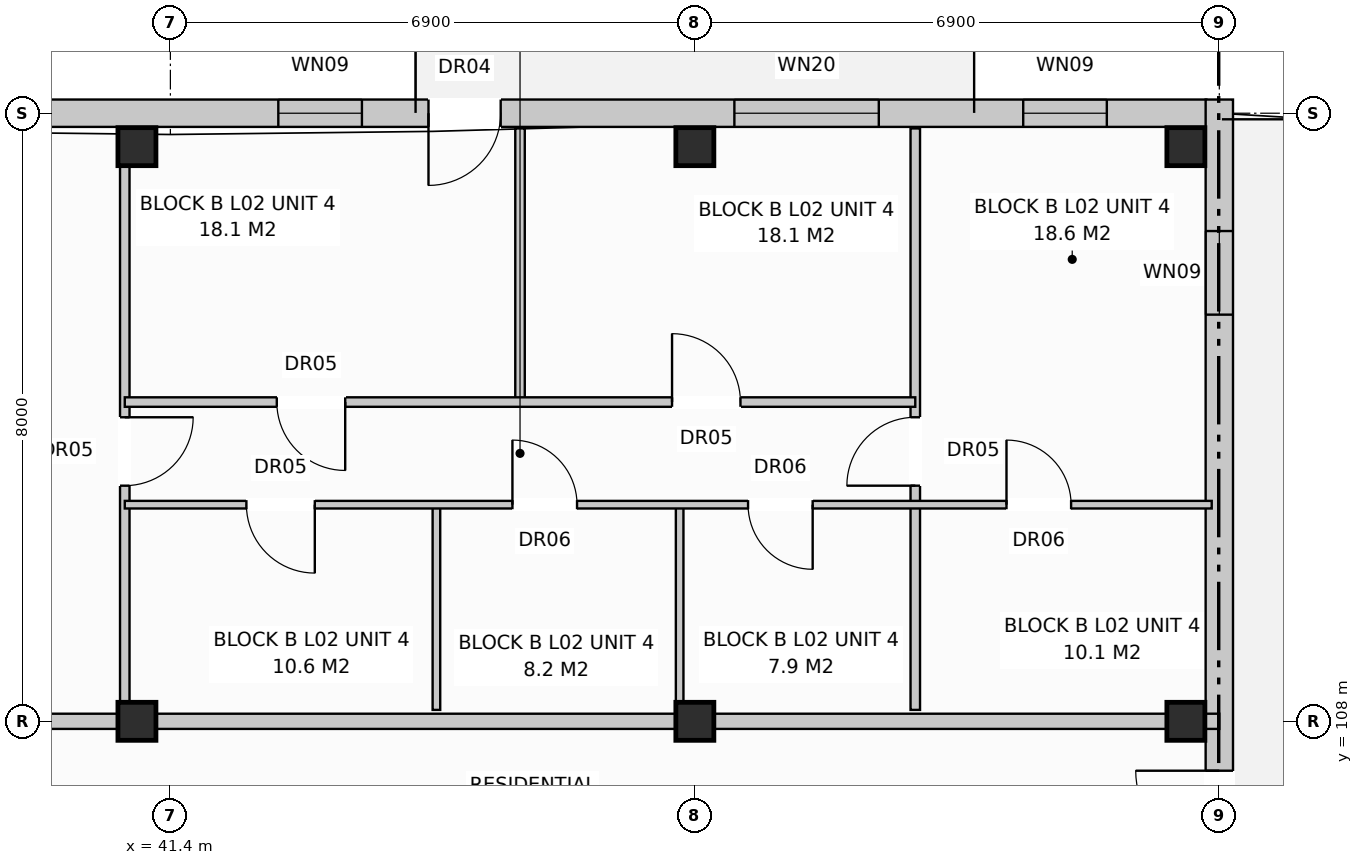
"""IFC4 building model, lengths in metres.
Left out: names, types, materials, properties, quantities, classifications, styles, units other than length and angle.
Written with IfcOpenShell. Run it as: python <this file> out.ifc"""

import sys

from ifc_helpers import new_model, si_unit, direction, frame, frame_2d, origin, origin_with_axes, origin_2d, place, context, subcontext, project, spatial, rectangle, extrude, element, fill, save


model = new_model("IFC4")
c1 = context("Model", 3, precision=1e-05, world=origin(), true_north=direction((0.0, 1.0)))
c2 = subcontext(c1, "Body", "Model", "MODEL_VIEW")
j1 = project(units=[si_unit("LENGTHUNIT", "METRE"), si_unit("PLANEANGLEUNIT", "RADIAN")], contexts=[c1])
p1 = place(None, origin())
s1 = spatial("IfcSite", under=j1, at=p1, CompositionType="ELEMENT")
p2 = place(p1, origin())
s2 = spatial("IfcBuilding", under=s1, at=p2, CompositionType="ELEMENT")
p3 = place(p2, frame((0.0, 0.0, 8.0)))
s3 = spatial("IfcBuildingStorey", under=s2, at=p3, CompositionType="ELEMENT", Elevation=8.0)
for number, where, z_axis, x_axis in (
    (1, (40.96, 108.0, 0.0), (0.0, 0.0, 1.0), (1.0, 0.0, 0.0)),
    (2, (40.96, 115.56, 0.0), (0.0, 0.0, 1.0), (1.0, 0.0, 0.0)),
    (3, (48.3, 108.0, 0.0), (0.0, 0.0, 1.0), (1.0, 0.0, 0.0)),
    (4, (48.3, 115.56, 0.0), (0.0, 0.0, 1.0), (1.0, 0.0, 0.0)),
    (5, (54.76, 108.0, 0.0), (0.0, 0.0, 1.0), (1.0, 0.0, 0.0)),
    (6, (54.76, 115.56, 0.0), (0.0, 0.0, 1.0), (1.0, 0.0, 0.0)),
):
    element("IfcColumn", number, at=place(p3, frame(where, z_axis=z_axis, x_axis=x_axis)), inside=s3, PredefinedType="COLUMN", context=c2, shape_type="SweptSolid", body=[
        extrude(rectangle(XDim=0.5, YDim=0.5, at=origin_2d()), origin(), (0.0, 0.0, 1.0), 3.2),
    ])
p4 = place(p3, frame((0.17, 116.0, 0.0), z_axis=(0.0, 0.0, 1.0), x_axis=(1.0, 0.0, 0.0)))
e7 = element("IfcWall", 7, at=p4, inside=s3, PredefinedType="STANDARD", context=c2, shape_type="SweptSolid", body=[
    extrude(rectangle(XDim=54.86, YDim=0.36, at=frame_2d((27.43, 0.0))), origin(), (0.0, 0.0, 1.0), 2.94),
])
p5 = place(p4, frame((5.1, 0.0, 0.0)))
e8 = element("IfcOpeningElement", 8, at=p5, cuts=e7, PredefinedType="OPENING", context=c2, shape_type="SweptSolid", body=[
    extrude(rectangle(XDim=0.95, YDim=2.1, at=frame_2d((0.475, 1.05))), frame((0.0, 0.192, 0.0), z_axis=(0.0, -1.0, 0.0), x_axis=(1.0, 0.0, 0.0)), (0.0, 0.0, 1.0), 0.384),
])
p6 = place(p4, frame((18.904, 0.0, 0.0)))
e9 = element("IfcOpeningElement", 9, at=p6, cuts=e7, PredefinedType="OPENING", context=c2, shape_type="SweptSolid", body=[
    extrude(rectangle(XDim=0.95, YDim=2.1, at=frame_2d((0.475, 1.05))), frame((0.0, 0.192, 0.0), z_axis=(0.0, -1.0, 0.0), x_axis=(1.0, 0.0, 0.0)), (0.0, 0.0, 1.0), 0.384),
])
p7 = place(p4, frame((32.704, 0.0, 0.0)))
e10 = element("IfcOpeningElement", 10, at=p7, cuts=e7, PredefinedType="OPENING", context=c2, shape_type="SweptSolid", body=[
    extrude(rectangle(XDim=0.95, YDim=2.1, at=frame_2d((0.475, 1.05))), frame((0.0, 0.192, 0.0), z_axis=(0.0, -1.0, 0.0), x_axis=(1.0, 0.0, 0.0)), (0.0, 0.0, 1.0), 0.384),
])
p8 = place(p4, frame((44.626, 0.0, 0.0)))
e11 = element("IfcOpeningElement", 11, at=p8, cuts=e7, PredefinedType="OPENING", context=c2, shape_type="SweptSolid", body=[
    extrude(rectangle(XDim=0.95, YDim=2.1, at=frame_2d((0.475, 1.05))), frame((0.0, 0.192, 0.0), z_axis=(0.0, -1.0, 0.0), x_axis=(1.0, 0.0, 0.0)), (0.0, 0.0, 1.0), 0.384),
])
p9 = place(p4, frame((1.25, 0.0, 0.72)))
e12 = element("IfcOpeningElement", 12, at=p9, cuts=e7, PredefinedType="OPENING", context=c2, shape_type="SweptSolid", body=[
    extrude(rectangle(XDim=1.1, YDim=1.5, at=frame_2d((0.55, 0.75))), frame((0.0, 0.192, 0.0), z_axis=(0.0, -1.0, 0.0), x_axis=(1.0, 0.0, 0.0)), (0.0, 0.0, 1.0), 0.384),
])
p10 = place(p4, frame((7.925, 0.0, 0.8)))
e13 = element("IfcOpeningElement", 13, at=p10, cuts=e7, PredefinedType="OPENING", context=c2, shape_type="SweptSolid", body=[
    extrude(rectangle(XDim=1.95, YDim=1.65, at=frame_2d((0.975, 0.825))), frame((0.0, 0.192, 0.0), z_axis=(0.0, -1.0, 0.0), x_axis=(1.0, 0.0, 0.0)), (0.0, 0.0, 1.0), 0.384),
])
p11 = place(p4, frame((11.65, 0.0, 0.72)))
e14 = element("IfcOpeningElement", 14, at=p11, cuts=e7, PredefinedType="OPENING", context=c2, shape_type="SweptSolid", body=[
    extrude(rectangle(XDim=1.1, YDim=1.5, at=frame_2d((0.55, 0.75))), frame((0.0, 0.192, 0.0), z_axis=(0.0, -1.0, 0.0), x_axis=(1.0, 0.0, 0.0)), (0.0, 0.0, 1.0), 0.384),
])
p12 = place(p4, frame((16.75, 0.0, 0.8)))
e15 = element("IfcOpeningElement", 15, at=p12, cuts=e7, PredefinedType="OPENING", context=c2, shape_type="SweptSolid", body=[
    extrude(rectangle(XDim=1.9, YDim=1.85, at=frame_2d((0.95, 0.925))), frame((0.0, 0.192, 0.0), z_axis=(0.0, -1.0, 0.0), x_axis=(1.0, 0.0, 0.0)), (0.0, 0.0, 1.0), 0.384),
])
p13 = place(p4, frame((22.225, 0.0, 0.8)))
e16 = element("IfcOpeningElement", 16, at=p13, cuts=e7, PredefinedType="OPENING", context=c2, shape_type="SweptSolid", body=[
    extrude(rectangle(XDim=1.95, YDim=1.65, at=frame_2d((0.975, 0.825))), frame((0.0, 0.192, 0.0), z_axis=(0.0, -1.0, 0.0), x_axis=(1.0, 0.0, 0.0)), (0.0, 0.0, 1.0), 0.384),
])
p14 = place(p4, frame((28.35, 0.0, 0.72)))
e17 = element("IfcOpeningElement", 17, at=p14, cuts=e7, PredefinedType="OPENING", context=c2, shape_type="SweptSolid", body=[
    extrude(rectangle(XDim=1.1, YDim=1.5, at=frame_2d((0.55, 0.75))), frame((0.0, 0.192, 0.0), z_axis=(0.0, -1.0, 0.0), x_axis=(1.0, 0.0, 0.0)), (0.0, 0.0, 1.0), 0.384),
])
p15 = place(p4, frame((30.55, 0.0, 0.8)))
e18 = element("IfcOpeningElement", 18, at=p15, cuts=e7, PredefinedType="OPENING", context=c2, shape_type="SweptSolid", body=[
    extrude(rectangle(XDim=1.9, YDim=1.85, at=frame_2d((0.95, 0.925))), frame((0.0, 0.192, 0.0), z_axis=(0.0, -1.0, 0.0), x_axis=(1.0, 0.0, 0.0)), (0.0, 0.0, 1.0), 0.384),
])
p16 = place(p4, frame((36.525, 0.0, 0.8)))
e19 = element("IfcOpeningElement", 19, at=p16, cuts=e7, PredefinedType="OPENING", context=c2, shape_type="SweptSolid", body=[
    extrude(rectangle(XDim=1.95, YDim=1.65, at=frame_2d((0.975, 0.825))), frame((0.0, 0.192, 0.0), z_axis=(0.0, -1.0, 0.0), x_axis=(1.0, 0.0, 0.0)), (0.0, 0.0, 1.0), 0.384),
])
p17 = place(p4, frame((42.65, 0.0, 0.72)))
e20 = element("IfcOpeningElement", 20, at=p17, cuts=e7, PredefinedType="OPENING", context=c2, shape_type="SweptSolid", body=[
    extrude(rectangle(XDim=1.1, YDim=1.5, at=frame_2d((0.55, 0.75))), frame((0.0, 0.192, 0.0), z_axis=(0.0, -1.0, 0.0), x_axis=(1.0, 0.0, 0.0)), (0.0, 0.0, 1.0), 0.384),
])
p18 = place(p4, frame((48.65, 0.0, 0.72)))
e21 = element("IfcOpeningElement", 21, at=p18, cuts=e7, PredefinedType="OPENING", context=c2, shape_type="SweptSolid", body=[
    extrude(rectangle(XDim=1.9, YDim=1.85, at=frame_2d((0.95, 0.925))), frame((0.0, 0.192, 0.0), z_axis=(0.0, -1.0, 0.0), x_axis=(1.0, 0.0, 0.0)), (0.0, 0.0, 1.0), 0.384),
])
p19 = place(p4, frame((52.45, 0.0, 0.72)))
e22 = element("IfcOpeningElement", 22, at=p19, cuts=e7, PredefinedType="OPENING", context=c2, shape_type="SweptSolid", body=[
    extrude(rectangle(XDim=1.1, YDim=1.5, at=frame_2d((0.55, 0.75))), frame((0.0, 0.192, 0.0), z_axis=(0.0, -1.0, 0.0), x_axis=(1.0, 0.0, 0.0)), (0.0, 0.0, 1.0), 0.384),
])
p20 = place(p3, frame((55.2, 97.42, 0.0), z_axis=(0.0, 0.0, 1.0), x_axis=(0.0, 1.0, 0.0)))
e23 = element("IfcWall", 23, at=p20, inside=s3, PredefinedType="STANDARD", context=c2, shape_type="SweptSolid", body=[
    extrude(rectangle(XDim=18.76, YDim=0.36, at=frame_2d((9.38, 0.0))), origin(), (0.0, 0.0, 1.0), 2.94),
])
p21 = place(p20, frame((8.83, 0.0, 0.0)))
e24 = element("IfcOpeningElement", 24, at=p21, cuts=e23, PredefinedType="OPENING", context=c2, shape_type="SweptSolid", body=[
    extrude(rectangle(XDim=1.1, YDim=2.1, at=frame_2d((0.55, 1.05))), frame((0.0, 0.192, 0.0), z_axis=(0.0, -1.0, 0.0), x_axis=(1.0, 0.0, 0.0)), (0.0, 0.0, 1.0), 0.384),
])
p22 = place(p20, frame((1.73, 0.0, 0.72)))
e25 = element("IfcOpeningElement", 25, at=p22, cuts=e23, PredefinedType="OPENING", context=c2, shape_type="SweptSolid", body=[
    extrude(rectangle(XDim=1.1, YDim=1.5, at=frame_2d((0.55, 0.75))), frame((0.0, 0.192, 0.0), z_axis=(0.0, -1.0, 0.0), x_axis=(1.0, 0.0, 0.0)), (0.0, 0.0, 1.0), 0.384),
])
p23 = place(p20, frame((15.93, 0.0, 0.72)))
e26 = element("IfcOpeningElement", 26, at=p23, cuts=e23, PredefinedType="OPENING", context=c2, shape_type="SweptSolid", body=[
    extrude(rectangle(XDim=1.1, YDim=1.5, at=frame_2d((0.55, 0.75))), frame((0.0, 0.192, 0.0), z_axis=(0.0, -1.0, 0.0), x_axis=(1.0, 0.0, 0.0)), (0.0, 0.0, 1.0), 0.384),
])
p24 = place(p3, frame((34.5, 108.0, 0.0), z_axis=(0.0, 0.0, 1.0), x_axis=(1.0, 0.0, 0.0)))
e27 = element("IfcWall", 27, at=p24, inside=s3, PredefinedType="PARTITIONING", context=c2, shape_type="SweptSolid", body=[
    extrude(rectangle(XDim=20.7, YDim=0.2, at=frame_2d((10.35, 0.0))), origin(), (0.0, 0.0, 1.0), 2.38),
])
p25 = place(p24, frame((2.4, 0.0, 0.0)))
e28 = element("IfcOpeningElement", 28, at=p25, cuts=e27, PredefinedType="OPENING", context=c2, shape_type="SweptSolid", body=[
    extrude(rectangle(XDim=0.95, YDim=2.15, at=frame_2d((0.475, 1.075))), frame((0.0, 0.112, 0.0), z_axis=(0.0, -1.0, 0.0), x_axis=(1.0, 0.0, 0.0)), (0.0, 0.0, 1.0), 0.224),
])
p26 = place(p3, frame((40.8, 108.15, 0.0), z_axis=(0.0, 0.0, 1.0), x_axis=(0.0, 1.0, 0.0)))
e29 = element("IfcWall", 29, at=p26, inside=s3, PredefinedType="PARTITIONING", context=c2, shape_type="SweptSolid", body=[
    extrude(rectangle(XDim=7.65, YDim=0.125, at=frame_2d((3.825, 0.0))), origin(), (0.0, 0.0, 1.0), 2.94),
])
p27 = place(p26, frame((2.95, 0.0, 0.0)))
e30 = element("IfcOpeningElement", 30, at=p27, cuts=e29, PredefinedType="OPENING", context=c2, shape_type="SweptSolid", body=[
    extrude(rectangle(XDim=0.9, YDim=2.1, at=frame_2d((0.45, 1.05))), frame((0.0, 0.074, 0.0), z_axis=(0.0, -1.0, 0.0), x_axis=(1.0, 0.0, 0.0)), (0.0, 0.0, 1.0), 0.149),
])
p28 = place(p3, frame((44.9, 108.15, 0.0), z_axis=(0.0, 0.0, 1.0), x_axis=(0.0, 1.0, 0.0)))
e31 = element("IfcWall", 31, at=p28, inside=s3, PredefinedType="PARTITIONING", context=c2, shape_type="SweptSolid", body=[
    extrude(rectangle(XDim=2.7, YDim=0.1, at=frame_2d((1.35, 0.0))), origin(), (0.0, 0.0, 1.0), 2.94),
])
p29 = place(p3, frame((48.1, 108.15, 0.0), z_axis=(0.0, 0.0, 1.0), x_axis=(0.0, 1.0, 0.0)))
e32 = element("IfcWall", 32, at=p29, inside=s3, PredefinedType="PARTITIONING", context=c2, shape_type="SweptSolid", body=[
    extrude(rectangle(XDim=2.7, YDim=0.1, at=frame_2d((1.35, 0.0))), origin(), (0.0, 0.0, 1.0), 2.38),
])
p30 = place(p3, frame((46.0, 112.2, 0.0), z_axis=(0.0, 0.0, 1.0), x_axis=(0.0, 1.0, 0.0)))
e33 = element("IfcWall", 33, at=p30, inside=s3, PredefinedType="PARTITIONING", context=c2, shape_type="SweptSolid", body=[
    extrude(rectangle(XDim=3.6, YDim=0.125, at=frame_2d((1.8, 0.0))), origin(), (0.0, 0.0, 1.0), 2.94),
])
p31 = place(p3, frame((51.2, 108.15, 0.0), z_axis=(0.0, 0.0, 1.0), x_axis=(0.0, 1.0, 0.0)))
e34 = element("IfcWall", 34, at=p31, inside=s3, PredefinedType="PARTITIONING", context=c2, shape_type="SweptSolid", body=[
    extrude(rectangle(XDim=7.65, YDim=0.125, at=frame_2d((3.825, 0.0))), origin(), (0.0, 0.0, 1.0), 2.94),
])
p32 = place(p31, frame((2.95, 0.0, 0.0)))
e35 = element("IfcOpeningElement", 35, at=p32, cuts=e34, PredefinedType="OPENING", context=c2, shape_type="SweptSolid", body=[
    extrude(rectangle(XDim=0.9, YDim=2.1, at=frame_2d((0.45, 1.05))), frame((0.0, 0.074, 0.0), z_axis=(0.0, -1.0, 0.0), x_axis=(1.0, 0.0, 0.0)), (0.0, 0.0, 1.0), 0.149),
])
p33 = place(p3, frame((40.8, 110.85, 0.0), z_axis=(0.0, 0.0, 1.0), x_axis=(1.0, 0.0, 0.0)))
e36 = element("IfcWall", 36, at=p33, inside=s3, PredefinedType="PARTITIONING", context=c2, shape_type="SweptSolid", body=[
    extrude(rectangle(XDim=14.3, YDim=0.1, at=frame_2d((7.15, 0.0))), origin(), (0.0, 0.0, 1.0), 2.94),
])
p34 = place(p33, frame((1.6, 0.0, 0.0)))
e37 = element("IfcOpeningElement", 37, at=p34, cuts=e36, PredefinedType="OPENING", context=c2, shape_type="SweptSolid", body=[
    extrude(rectangle(XDim=0.9, YDim=2.1, at=frame_2d((0.45, 1.05))), frame((0.0, 0.062, 0.0), z_axis=(0.0, -1.0, 0.0), x_axis=(1.0, 0.0, 0.0)), (0.0, 0.0, 1.0), 0.124),
])
p35 = place(p33, frame((5.1, 0.0, 0.0)))
e38 = element("IfcOpeningElement", 38, at=p35, cuts=e36, PredefinedType="OPENING", context=c2, shape_type="SweptSolid", body=[
    extrude(rectangle(XDim=0.85, YDim=2.05, at=frame_2d((0.425, 1.025))), frame((0.0, 0.062, 0.0), z_axis=(0.0, -1.0, 0.0), x_axis=(1.0, 0.0, 0.0)), (0.0, 0.0, 1.0), 0.124),
])
p36 = place(p33, frame((8.2, 0.0, 0.0)))
e39 = element("IfcOpeningElement", 39, at=p36, cuts=e36, PredefinedType="OPENING", context=c2, shape_type="SweptSolid", body=[
    extrude(rectangle(XDim=0.85, YDim=2.05, at=frame_2d((0.425, 1.025))), frame((0.0, 0.062, 0.0), z_axis=(0.0, -1.0, 0.0), x_axis=(1.0, 0.0, 0.0)), (0.0, 0.0, 1.0), 0.124),
])
p37 = place(p33, frame((11.6, 0.0, 0.0)))
e40 = element("IfcOpeningElement", 40, at=p37, cuts=e36, PredefinedType="OPENING", context=c2, shape_type="SweptSolid", body=[
    extrude(rectangle(XDim=0.85, YDim=2.05, at=frame_2d((0.425, 1.025))), frame((0.0, 0.062, 0.0), z_axis=(0.0, -1.0, 0.0), x_axis=(1.0, 0.0, 0.0)), (0.0, 0.0, 1.0), 0.124),
])
p38 = place(p3, frame((40.8, 112.2, 0.0), z_axis=(0.0, 0.0, 1.0), x_axis=(1.0, 0.0, 0.0)))
e41 = element("IfcWall", 41, at=p38, inside=s3, PredefinedType="PARTITIONING", context=c2, shape_type="SweptSolid", body=[
    extrude(rectangle(XDim=10.4, YDim=0.125, at=frame_2d((5.2, 0.0))), origin(), (0.0, 0.0, 1.0), 2.94),
])
p39 = place(p38, frame((2.0, 0.0, 0.0)))
e42 = element("IfcOpeningElement", 42, at=p39, cuts=e41, PredefinedType="OPENING", context=c2, shape_type="SweptSolid", body=[
    extrude(rectangle(XDim=0.9, YDim=2.1, at=frame_2d((0.45, 1.05))), frame((0.0, 0.074, 0.0), z_axis=(0.0, -1.0, 0.0), x_axis=(1.0, 0.0, 0.0)), (0.0, 0.0, 1.0), 0.149),
])
p40 = place(p38, frame((7.2, 0.0, 0.0)))
e43 = element("IfcOpeningElement", 43, at=p40, cuts=e41, PredefinedType="OPENING", context=c2, shape_type="SweptSolid", body=[
    extrude(rectangle(XDim=0.9, YDim=2.1, at=frame_2d((0.45, 1.05))), frame((0.0, 0.074, 0.0), z_axis=(0.0, -1.0, 0.0), x_axis=(1.0, 0.0, 0.0)), (0.0, 0.0, 1.0), 0.149),
])
p41 = place(p8, frame((0.95, 0.0, 0.0), z_axis=(0.0, 0.0, 1.0), x_axis=(-1.0, 0.0, 0.0)))
e44 = element("IfcDoor", 44, at=p41, inside=s3, OperationType="SINGLE_SWING_LEFT", PredefinedType="DOOR", context=c2, shape_type="SweptSolid", body=[
    extrude(rectangle(XDim=0.95, YDim=2.1, at=frame_2d((0.475, 1.05))), frame((0.0, 0.025, 0.0), z_axis=(0.0, -1.0, 0.0), x_axis=(1.0, 0.0, 0.0)), (0.0, 0.0, 1.0), 0.05),
])
fill(e11, e44)
p42 = place(p17, origin_with_axes())
e45 = element("IfcWindow", 45, at=p42, inside=s3, PartitioningType="SINGLE_PANEL", PredefinedType="WINDOW", context=c2, shape_type="SweptSolid", body=[
    extrude(rectangle(XDim=1.1, YDim=1.5, at=frame_2d((0.55, 0.75))), frame((0.0, 0.03, 0.0), z_axis=(0.0, -1.0, 0.0), x_axis=(1.0, 0.0, 0.0)), (0.0, 0.0, 1.0), 0.06),
])
fill(e20, e45)
p43 = place(p18, origin_with_axes())
e46 = element("IfcWindow", 46, at=p43, inside=s3, PartitioningType="SINGLE_PANEL", PredefinedType="WINDOW", context=c2, shape_type="SweptSolid", body=[
    extrude(rectangle(XDim=1.9, YDim=1.85, at=frame_2d((0.95, 0.925))), frame((0.0, 0.03, 0.0), z_axis=(0.0, -1.0, 0.0), x_axis=(1.0, 0.0, 0.0)), (0.0, 0.0, 1.0), 0.06),
])
fill(e21, e46)
p44 = place(p19, origin_with_axes())
e47 = element("IfcWindow", 47, at=p44, inside=s3, PartitioningType="SINGLE_PANEL", PredefinedType="WINDOW", context=c2, shape_type="SweptSolid", body=[
    extrude(rectangle(XDim=1.1, YDim=1.5, at=frame_2d((0.55, 0.75))), frame((0.0, 0.03, 0.0), z_axis=(0.0, -1.0, 0.0), x_axis=(1.0, 0.0, 0.0)), (0.0, 0.0, 1.0), 0.06),
])
fill(e22, e47)
p45 = place(p21, origin_with_axes())
e48 = element("IfcDoor", 48, at=p45, inside=s3, OperationType="SINGLE_SWING_RIGHT", PredefinedType="DOOR", context=c2, shape_type="SweptSolid", body=[
    extrude(rectangle(XDim=1.1, YDim=2.1, at=frame_2d((0.55, 1.05))), frame((0.0, 0.025, 0.0), z_axis=(0.0, -1.0, 0.0), x_axis=(1.0, 0.0, 0.0)), (0.0, 0.0, 1.0), 0.05),
])
fill(e24, e48)
p46 = place(p23, origin_with_axes())
e49 = element("IfcWindow", 49, at=p46, inside=s3, PartitioningType="SINGLE_PANEL", PredefinedType="WINDOW", context=c2, shape_type="SweptSolid", body=[
    extrude(rectangle(XDim=1.1, YDim=1.5, at=frame_2d((0.55, 0.75))), frame((0.0, 0.03, 0.0), z_axis=(0.0, -1.0, 0.0), x_axis=(1.0, 0.0, 0.0)), (0.0, 0.0, 1.0), 0.06),
])
fill(e26, e49)
p47 = place(p27, frame((0.9, 0.0, 0.0), z_axis=(0.0, 0.0, 1.0), x_axis=(-1.0, 0.0, 0.0)))
e50 = element("IfcDoor", 50, at=p47, inside=s3, OperationType="SINGLE_SWING_RIGHT", PredefinedType="DOOR", context=c2, shape_type="SweptSolid", body=[
    extrude(rectangle(XDim=0.9, YDim=2.1, at=frame_2d((0.45, 1.05))), frame((0.0, 0.025, 0.0), z_axis=(0.0, -1.0, 0.0), x_axis=(1.0, 0.0, 0.0)), (0.0, 0.0, 1.0), 0.05),
])
fill(e30, e50)
p48 = place(p32, origin_with_axes())
e51 = element("IfcDoor", 51, at=p48, inside=s3, OperationType="SINGLE_SWING_LEFT", PredefinedType="DOOR", context=c2, shape_type="SweptSolid", body=[
    extrude(rectangle(XDim=0.9, YDim=2.1, at=frame_2d((0.45, 1.05))), frame((0.0, 0.025, 0.0), z_axis=(0.0, -1.0, 0.0), x_axis=(1.0, 0.0, 0.0)), (0.0, 0.0, 1.0), 0.05),
])
fill(e35, e51)
p49 = place(p34, frame((0.9, 0.0, 0.0), z_axis=(0.0, 0.0, 1.0), x_axis=(-1.0, 0.0, 0.0)))
e52 = element("IfcDoor", 52, at=p49, inside=s3, OperationType="SINGLE_SWING_RIGHT", PredefinedType="DOOR", context=c2, shape_type="SweptSolid", body=[
    extrude(rectangle(XDim=0.9, YDim=2.1, at=frame_2d((0.45, 1.05))), frame((0.0, 0.025, 0.0), z_axis=(0.0, -1.0, 0.0), x_axis=(1.0, 0.0, 0.0)), (0.0, 0.0, 1.0), 0.05),
])
fill(e37, e52)
p50 = place(p35, origin_with_axes())
e53 = element("IfcDoor", 53, at=p50, inside=s3, OperationType="SINGLE_SWING_LEFT", PredefinedType="DOOR", context=c2, shape_type="SweptSolid", body=[
    extrude(rectangle(XDim=0.85, YDim=2.05, at=frame_2d((0.425, 1.025))), frame((0.0, 0.025, 0.0), z_axis=(0.0, -1.0, 0.0), x_axis=(1.0, 0.0, 0.0)), (0.0, 0.0, 1.0), 0.05),
])
fill(e38, e53)
p51 = place(p36, frame((0.85, 0.0, 0.0), z_axis=(0.0, 0.0, 1.0), x_axis=(-1.0, 0.0, 0.0)))
e54 = element("IfcDoor", 54, at=p51, inside=s3, OperationType="SINGLE_SWING_RIGHT", PredefinedType="DOOR", context=c2, shape_type="SweptSolid", body=[
    extrude(rectangle(XDim=0.85, YDim=2.05, at=frame_2d((0.425, 1.025))), frame((0.0, 0.025, 0.0), z_axis=(0.0, -1.0, 0.0), x_axis=(1.0, 0.0, 0.0)), (0.0, 0.0, 1.0), 0.05),
])
fill(e39, e54)
p52 = place(p37, origin_with_axes())
e55 = element("IfcDoor", 55, at=p52, inside=s3, OperationType="SINGLE_SWING_LEFT", PredefinedType="DOOR", context=c2, shape_type="SweptSolid", body=[
    extrude(rectangle(XDim=0.85, YDim=2.05, at=frame_2d((0.425, 1.025))), frame((0.0, 0.025, 0.0), z_axis=(0.0, -1.0, 0.0), x_axis=(1.0, 0.0, 0.0)), (0.0, 0.0, 1.0), 0.05),
])
fill(e40, e55)
p53 = place(p39, frame((0.9, 0.0, 0.0), z_axis=(0.0, 0.0, 1.0), x_axis=(-1.0, 0.0, 0.0)))
e56 = element("IfcDoor", 56, at=p53, inside=s3, OperationType="SINGLE_SWING_RIGHT", PredefinedType="DOOR", context=c2, shape_type="SweptSolid", body=[
    extrude(rectangle(XDim=0.9, YDim=2.1, at=frame_2d((0.45, 1.05))), frame((0.0, 0.025, 0.0), z_axis=(0.0, -1.0, 0.0), x_axis=(1.0, 0.0, 0.0)), (0.0, 0.0, 1.0), 0.05),
])
fill(e42, e56)
p54 = place(p40, origin_with_axes())
e57 = element("IfcDoor", 57, at=p54, inside=s3, OperationType="SINGLE_SWING_LEFT", PredefinedType="DOOR", context=c2, shape_type="SweptSolid", body=[
    extrude(rectangle(XDim=0.9, YDim=2.1, at=frame_2d((0.45, 1.05))), frame((0.0, 0.025, 0.0), z_axis=(0.0, -1.0, 0.0), x_axis=(1.0, 0.0, 0.0)), (0.0, 0.0, 1.0), 0.05),
])
fill(e43, e57)
save(model, sys.argv[1])
